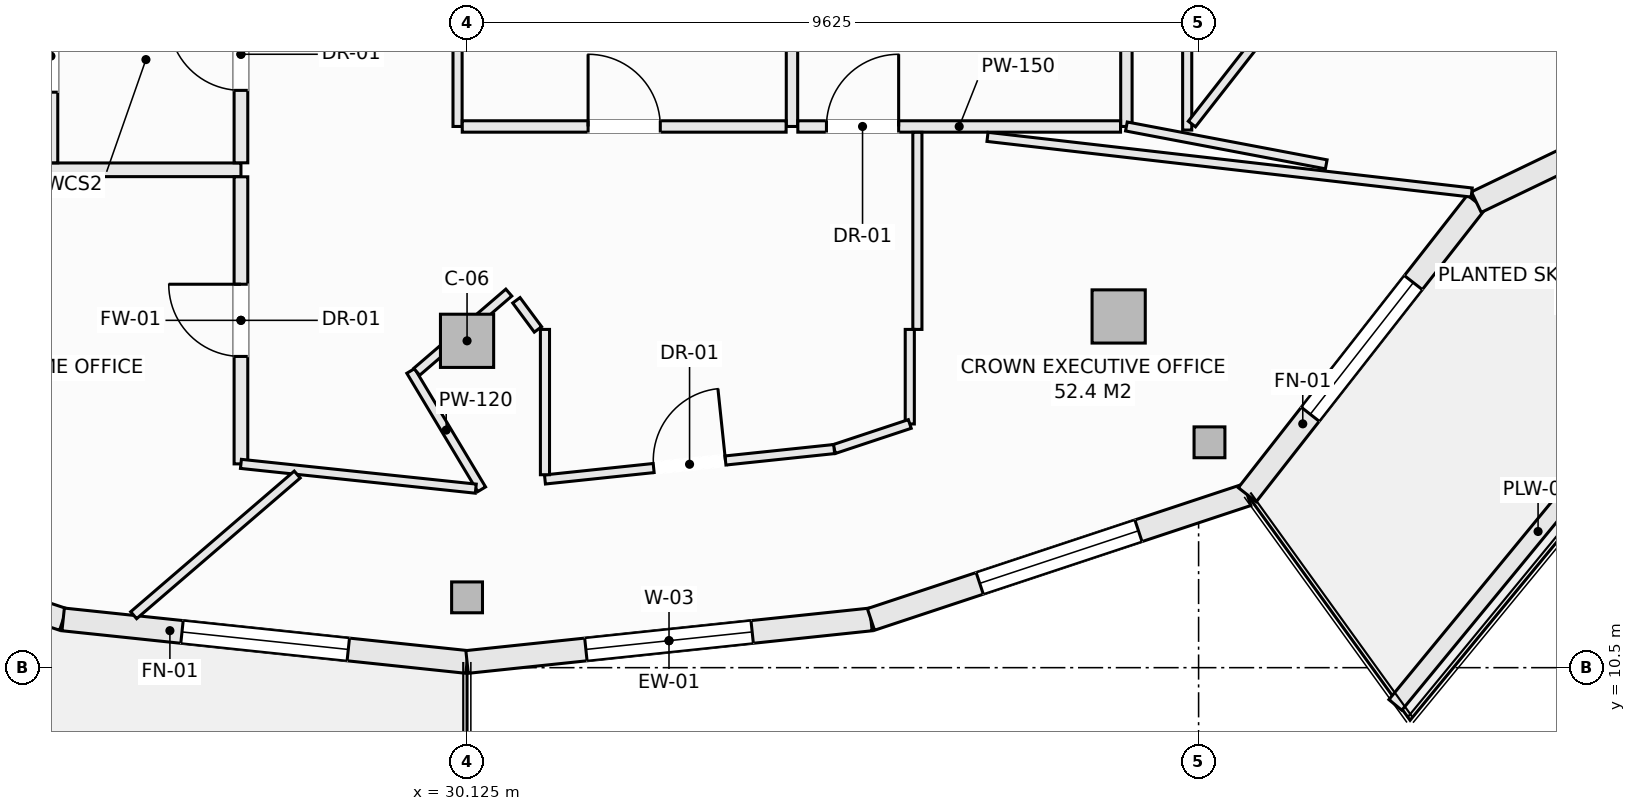
"""IFC4 building model, lengths in metres.
Left out: names, types, materials, properties, quantities, classifications, styles, units other than length and angle.
Written with IfcOpenShell. Run it as: python <this file> out.ifc"""

import sys

from ifc_helpers import new_model, si_unit, direction, frame, frame_2d, origin, origin_2d, place, context, subcontext, project, spatial, rectangle, hollow_rectangle, extrude, element, fill, save


model = new_model("IFC4")
c1 = context("Model", 3, precision=1e-05, world=origin(), true_north=direction((0.0, 1.0)))
c2 = subcontext(c1, "Body", "Model", "MODEL_VIEW")
j1 = project(units=[si_unit("LENGTHUNIT", "METRE"), si_unit("PLANEANGLEUNIT", "RADIAN")], contexts=[c1])
p1 = place(None, origin())
s1 = spatial("IfcSite", under=j1, at=p1, CompositionType="ELEMENT")
p2 = place(p1, origin())
s2 = spatial("IfcBuilding", under=s1, at=p2, CompositionType="ELEMENT")
p3 = place(p2, frame((0.0, 0.0, 259.1)))
s3 = spatial("IfcBuildingStorey", under=s2, at=p3, CompositionType="ELEMENT", Elevation=259.1)
for number, where, z_axis, x_axis in (
    (1, (30.125, 11.425, -0.27), (0.0, 0.0, 1.0), (1.0, 0.0, 0.0)),
    (2, (39.893, 13.465, -0.27), (0.0, 0.0, 1.0), (1.0, 0.0, 0.0)),
):
    element("IfcColumn", number, at=place(p3, frame(where, z_axis=z_axis, x_axis=x_axis)), inside=s3, PredefinedType="COLUMN", context=c2, shape_type="SweptSolid", body=[
        extrude(hollow_rectangle(XDim=0.406, YDim=0.406, WallThickness=0.016, at=origin_2d()), origin(), (0.0, 0.0, 1.0), 3.3),
    ])
for number, where, z_axis, x_axis in (
    (3, (30.125, 14.8, -0.27), (0.0, 0.0, 1.0), (1.0, 0.0, 0.0)),
    (4, (38.698, 15.121, -0.27), (0.0, 0.0, 1.0), (1.0, 0.0, 0.0)),
):
    element("IfcColumn", number, at=place(p3, frame(where, z_axis=z_axis, x_axis=x_axis)), inside=s3, PredefinedType="COLUMN", context=c2, shape_type="SweptSolid", body=[
        extrude(rectangle(XDim=0.7, YDim=0.7, at=origin_2d()), origin(), (0.0, 0.0, 1.0), 3.3),
    ])
p4 = place(p3, frame((19.859, 12.775, 0.0), z_axis=(0.0, 0.0, 1.0), x_axis=(0.949252744709, -0.314514271001, 0.0)))
e5 = element("IfcWall", 5, at=p4, inside=s3, PredefinedType="SOLIDWALL", context=c2, shape_type="SweptSolid", body=[
    extrude(rectangle(XDim=5.216, YDim=0.3, at=frame_2d((2.608, 0.0))), origin(), (0.0, 0.0, 1.0), 2.605),
])
p5 = place(p4, frame((1.708, 0.0, 0.0)))
e6 = element("IfcOpeningElement", 6, at=p5, cuts=e5, PredefinedType="OPENING", context=c2, shape_type="SweptSolid", body=[
    extrude(rectangle(XDim=1.8, YDim=2.25, at=frame_2d((0.9, 1.125))), frame((0.0, 0.16, 0.0), z_axis=(0.0, -1.0, 0.0), x_axis=(1.0, 0.0, 0.0)), (0.0, 0.0, 1.0), 0.32),
])
p6 = place(p3, frame((24.811, 11.135, 0.0), z_axis=(0.0, 0.0, 1.0), x_axis=(0.9944966869, -0.104768028258, 0.0)))
e7 = element("IfcWall", 7, at=p6, inside=s3, PredefinedType="SOLIDWALL", context=c2, shape_type="SweptSolid", body=[
    extrude(rectangle(XDim=5.343, YDim=0.3, at=frame_2d((2.672, 0.0))), origin(), (0.0, 0.0, 1.0), 2.605),
])
p7 = place(p6, frame((1.572, 0.0, 0.72)))
e8 = element("IfcOpeningElement", 8, at=p7, cuts=e7, PredefinedType="OPENING", context=c2, shape_type="SweptSolid", body=[
    extrude(rectangle(XDim=2.2, YDim=1.65, at=frame_2d((1.1, 0.825))), frame((0.0, 0.16, 0.0), z_axis=(0.0, -1.0, 0.0), x_axis=(1.0, 0.0, 0.0)), (0.0, 0.0, 1.0), 0.32),
])
p8 = place(p3, frame((30.125, 10.575, 0.0), z_axis=(0.0, 0.0, 1.0), x_axis=(0.9944966869, 0.104768028258, 0.0)))
e9 = element("IfcWall", 9, at=p8, inside=s3, PredefinedType="SOLIDWALL", context=c2, shape_type="SweptSolid", body=[
    extrude(rectangle(XDim=5.343, YDim=0.3, at=frame_2d((2.672, 0.0))), origin(), (0.0, 0.0, 1.0), 2.605),
])
p9 = place(p8, frame((1.572, 0.0, 0.72)))
e10 = element("IfcOpeningElement", 10, at=p9, cuts=e9, PredefinedType="OPENING", context=c2, shape_type="SweptSolid", body=[
    extrude(rectangle(XDim=2.2, YDim=1.65, at=frame_2d((1.1, 0.825))), frame((0.0, 0.16, 0.0), z_axis=(0.0, -1.0, 0.0), x_axis=(1.0, 0.0, 0.0)), (0.0, 0.0, 1.0), 0.32),
])
p10 = place(p3, frame((35.439, 11.135, 0.0), z_axis=(0.0, 0.0, 1.0), x_axis=(0.949252744709, 0.314514271001, 0.0)))
e11 = element("IfcWall", 11, at=p10, inside=s3, PredefinedType="SOLIDWALL", context=c2, shape_type="SweptSolid", body=[
    extrude(rectangle(XDim=5.216, YDim=0.3, at=frame_2d((2.608, 0.0))), origin(), (0.0, 0.0, 1.0), 2.605),
])
p11 = place(p10, frame((1.508, 0.0, 0.72)))
e12 = element("IfcOpeningElement", 12, at=p11, cuts=e11, PredefinedType="OPENING", context=c2, shape_type="SweptSolid", body=[
    extrude(rectangle(XDim=2.2, YDim=1.65, at=frame_2d((1.1, 0.825))), frame((0.0, 0.16, 0.0), z_axis=(0.0, -1.0, 0.0), x_axis=(1.0, 0.0, 0.0)), (0.0, 0.0, 1.0), 0.32),
])
p12 = place(p3, frame((40.391, 12.775, 0.0), z_axis=(0.0, 0.0, 1.0), x_axis=(0.616413297421, 0.78742278781, 0.0)))
e13 = element("IfcWall", 13, at=p12, inside=s3, PredefinedType="SOLIDWALL", context=c2, shape_type="SweptSolid", body=[
    extrude(rectangle(XDim=4.888, YDim=0.3, at=frame_2d((2.444, 0.0))), origin(), (0.0, 0.0, 1.0), 2.605),
])
p13 = place(p12, frame((1.344, 0.0, 0.72)))
e14 = element("IfcOpeningElement", 14, at=p13, cuts=e13, PredefinedType="OPENING", context=c2, shape_type="SweptSolid", body=[
    extrude(rectangle(XDim=2.2, YDim=1.65, at=frame_2d((1.1, 0.825))), frame((0.0, 0.16, 0.0), z_axis=(0.0, -1.0, 0.0), x_axis=(1.0, 0.0, 0.0)), (0.0, 0.0, 1.0), 0.32),
])
p14 = place(p3, frame((43.404, 16.625, 0.0), z_axis=(0.0, 0.0, 1.0), x_axis=(0.901346013132, 0.433099716706, 0.0)))
e15 = element("IfcWall", 15, at=p14, inside=s3, PredefinedType="SOLIDWALL", context=c2, shape_type="SweptSolid", body=[
    extrude(rectangle(XDim=4.994, YDim=0.3, at=frame_2d((2.497, 0.0))), origin(), (0.0, 0.0, 1.0), 2.605),
])
p15 = place(p14, frame((1.597, 0.0, 0.0)))
e16 = element("IfcOpeningElement", 16, at=p15, cuts=e15, PredefinedType="OPENING", context=c2, shape_type="SweptSolid", body=[
    extrude(rectangle(XDim=1.8, YDim=2.25, at=frame_2d((0.9, 1.125))), frame((0.0, 0.16, 0.0), z_axis=(0.0, -1.0, 0.0), x_axis=(1.0, 0.0, 0.0)), (0.0, 0.0, 1.0), 0.32),
])
p16 = place(p3, frame((42.339, 10.01, 0.0), z_axis=(0.0, 0.0, 1.0), x_axis=(0.635450933862, 0.772141250455, 0.0)))
e17 = element("IfcWall", 17, at=p16, inside=s3, PredefinedType="PARAPET", context=c2, shape_type="SweptSolid", body=[
    extrude(rectangle(XDim=5.91, YDim=0.22, at=frame_2d((2.955, 0.0))), origin(), (0.0, 0.0, 1.0), 0.52),
])
p17 = place(p3, frame((22.15, 17.05, 0.0), z_axis=(0.0, 0.0, 1.0), x_axis=(1.0, 0.0, 0.0)))
e18 = element("IfcWall", 18, at=p17, inside=s3, PredefinedType="SOLIDWALL", context=c2, shape_type="SweptSolid", body=[
    extrude(rectangle(XDim=5.0, YDim=0.18, at=frame_2d((2.5, 0.0))), origin(), (0.0, 0.0, 1.0), 3.03),
])
p18 = place(p3, frame((24.65, 17.142, 0.0), z_axis=(0.0, 0.0, 1.0), x_axis=(0.0, 1.0, 0.0)))
e19 = element("IfcWall", 19, at=p18, inside=s3, PredefinedType="SOLIDWALL", context=c2, shape_type="SweptSolid", body=[
    extrude(rectangle(XDim=2.808, YDim=0.18, at=frame_2d((1.404, 0.0))), origin(), (0.0, 0.0, 1.0), 3.03),
])
p19 = place(p18, frame((0.929, 0.0, 0.0)))
e20 = element("IfcOpeningElement", 20, at=p19, cuts=e19, PredefinedType="OPENING", context=c2, shape_type="SweptSolid", body=[
    extrude(rectangle(XDim=0.95, YDim=2.1, at=frame_2d((0.475, 1.05))), frame((0.0, 0.1, 0.0), z_axis=(0.0, -1.0, 0.0), x_axis=(1.0, 0.0, 0.0)), (0.0, 0.0, 1.0), 0.2),
])
p20 = place(p3, frame((27.15, 13.181, 0.0), z_axis=(0.0, 0.0, 1.0), x_axis=(0.0, 1.0, 0.0)))
e21 = element("IfcWall", 21, at=p20, inside=s3, PredefinedType="SOLIDWALL", context=c2, shape_type="SweptSolid", body=[
    extrude(rectangle(XDim=3.777, YDim=0.18, at=frame_2d((1.889, 0.0))), origin(), (0.0, 0.0, 1.0), 3.03),
])
p21 = place(p20, frame((1.414, 0.0, 0.0)))
e22 = element("IfcOpeningElement", 22, at=p21, cuts=e21, PredefinedType="OPENING", context=c2, shape_type="SweptSolid", body=[
    extrude(rectangle(XDim=0.95, YDim=2.1, at=frame_2d((0.475, 1.05))), frame((0.0, 0.1, 0.0), z_axis=(0.0, -1.0, 0.0), x_axis=(1.0, 0.0, 0.0)), (0.0, 0.0, 1.0), 0.2),
])
p22 = place(p3, frame((27.15, 17.142, 0.0), z_axis=(0.0, 0.0, 1.0), x_axis=(0.0, 1.0, 0.0)))
e23 = element("IfcWall", 23, at=p22, inside=s3, PredefinedType="SOLIDWALL", context=c2, shape_type="SweptSolid", body=[
    extrude(rectangle(XDim=2.856, YDim=0.18, at=frame_2d((1.428, 0.0))), origin(), (0.0, 0.0, 1.0), 3.03),
])
p23 = place(p22, frame((0.953, 0.0, 0.0)))
e24 = element("IfcOpeningElement", 24, at=p23, cuts=e23, PredefinedType="OPENING", context=c2, shape_type="SweptSolid", body=[
    extrude(rectangle(XDim=0.95, YDim=2.1, at=frame_2d((0.475, 1.05))), frame((0.0, 0.1, 0.0), z_axis=(0.0, -1.0, 0.0), x_axis=(1.0, 0.0, 0.0)), (0.0, 0.0, 1.0), 0.2),
])
p24 = place(p3, frame((30.0, 17.62, 0.0), z_axis=(0.0, 0.0, 1.0), x_axis=(0.0, 1.0, 0.0)))
e25 = element("IfcWall", 25, at=p24, inside=s3, PredefinedType="PARTITIONING", context=c2, shape_type="SweptSolid", body=[
    extrude(rectangle(XDim=2.18, YDim=0.12, at=frame_2d((1.09, 0.0))), origin(), (0.0, 0.0, 1.0), 3.03),
])
for number, where, z_axis, x_axis in (
    (26, (38.8, 17.62, 0.0), (0.0, 0.0, 1.0), (0.0, 1.0, 0.0)),
    (27, (34.4, 17.62, 0.0), (0.0, 0.0, 1.0), (0.0, 1.0, 0.0)),
):
    element("IfcWall", number, at=place(p3, frame(where, z_axis=z_axis, x_axis=x_axis)), inside=s3, PredefinedType="PARTITIONING", context=c2, shape_type="SweptSolid", body=[
        extrude(rectangle(XDim=2.18, YDim=0.15, at=frame_2d((1.09, 0.0))), origin(), (0.0, 0.0, 1.0), 3.03),
    ])
p25 = place(p3, frame((30.062, 17.62, 0.0), z_axis=(0.0, 0.0, 1.0), x_axis=(1.0, 0.0, 0.0)))
e28 = element("IfcWall", 28, at=p25, inside=s3, PredefinedType="PARTITIONING", context=c2, shape_type="SweptSolid", body=[
    extrude(rectangle(XDim=4.261, YDim=0.15, at=frame_2d((2.13, 0.0))), origin(), (0.0, 0.0, 1.0), 3.03),
])
p26 = place(p25, frame((1.656, 0.0, 0.0)))
e29 = element("IfcOpeningElement", 29, at=p26, cuts=e28, PredefinedType="OPENING", context=c2, shape_type="SweptSolid", body=[
    extrude(rectangle(XDim=0.95, YDim=2.1, at=frame_2d((0.475, 1.05))), frame((0.0, 0.085, 0.0), z_axis=(0.0, -1.0, 0.0), x_axis=(1.0, 0.0, 0.0)), (0.0, 0.0, 1.0), 0.17),
])
p27 = place(p3, frame((34.477, 17.62, 0.0), z_axis=(0.0, 0.0, 1.0), x_axis=(1.0, 0.0, 0.0)))
e30 = element("IfcWall", 30, at=p27, inside=s3, PredefinedType="PARTITIONING", context=c2, shape_type="SweptSolid", body=[
    extrude(rectangle(XDim=4.246, YDim=0.15, at=frame_2d((2.123, 0.0))), origin(), (0.0, 0.0, 1.0), 3.03),
])
p28 = place(p27, frame((0.376, 0.0, 0.0)))
e31 = element("IfcOpeningElement", 31, at=p28, cuts=e30, PredefinedType="OPENING", context=c2, shape_type="SweptSolid", body=[
    extrude(rectangle(XDim=0.95, YDim=2.1, at=frame_2d((0.475, 1.05))), frame((0.0, 0.085, 0.0), z_axis=(0.0, -1.0, 0.0), x_axis=(1.0, 0.0, 0.0)), (0.0, 0.0, 1.0), 0.17),
])
p29 = place(p3, frame((39.6, 17.573, 0.0), z_axis=(0.0, 0.0, 1.0), x_axis=(0.0, 1.0, 0.0)))
e32 = element("IfcWall", 32, at=p29, inside=s3, PredefinedType="PARTITIONING", context=c2, shape_type="SweptSolid", body=[
    extrude(rectangle(XDim=5.447, YDim=0.12, at=frame_2d((2.724, 0.0))), origin(), (0.0, 0.0, 1.0), 2.478),
])
p30 = place(p3, frame((39.662, 17.652, 0.0), z_axis=(0.0, 0.0, 1.0), x_axis=(0.616212345115, 0.78758005671, 0.0)))
e33 = element("IfcWall", 33, at=p30, inside=s3, PredefinedType="PARTITIONING", context=c2, shape_type="SweptSolid", body=[
    extrude(rectangle(XDim=2.333, YDim=0.12, at=frame_2d((1.167, 0.0))), origin(), (0.0, 0.0, 1.0), 2.478),
])
p31 = place(p3, frame((36.05, 14.95, 0.0), z_axis=(0.0, 0.0, 1.0), x_axis=(0.0, 1.0, 0.0)))
e34 = element("IfcWall", 34, at=p31, inside=s3, PredefinedType="PARTITIONING", context=c2, shape_type="SweptSolid", body=[
    extrude(rectangle(XDim=2.593, YDim=0.12, at=frame_2d((1.296, 0.0))), origin(), (0.0, 0.0, 1.0), 3.03),
])
p32 = place(p3, frame((35.95, 13.706, 0.0), z_axis=(0.0, 0.0, 1.0), x_axis=(0.0, 1.0, 0.0)))
e35 = element("IfcWall", 35, at=p32, inside=s3, PredefinedType="PARTITIONING", context=c2, shape_type="SweptSolid", body=[
    extrude(rectangle(XDim=1.244, YDim=0.12, at=frame_2d((0.622, 0.0))), origin(), (0.0, 0.0, 1.0), 3.03),
])
p33 = place(p3, frame((34.955, 13.376, 0.0), z_axis=(0.0, 0.0, 1.0), x_axis=(0.949124905871, 0.314899846071, 0.0)))
e36 = element("IfcWall", 36, at=p33, inside=s3, PredefinedType="PARTITIONING", context=c2, shape_type="SweptSolid", body=[
    extrude(rectangle(XDim=1.048, YDim=0.12, at=frame_2d((0.524, 0.0))), origin(), (0.0, 0.0, 1.0), 3.03),
])
p34 = place(p3, frame((31.15, 12.976, 0.0), z_axis=(0.0, 0.0, 1.0), x_axis=(0.994522920899, 0.104518705533, 0.0)))
e37 = element("IfcWall", 37, at=p34, inside=s3, PredefinedType="PARTITIONING", context=c2, shape_type="SweptSolid", body=[
    extrude(rectangle(XDim=3.826, YDim=0.12, at=frame_2d((1.913, 0.0))), origin(), (0.0, 0.0, 1.0), 3.03),
])
p35 = place(p34, frame((1.438, 0.0, 0.0)))
e38 = element("IfcOpeningElement", 38, at=p35, cuts=e37, PredefinedType="OPENING", context=c2, shape_type="SweptSolid", body=[
    extrude(rectangle(XDim=0.95, YDim=2.1, at=frame_2d((0.475, 1.05))), frame((0.0, 0.07, 0.0), z_axis=(0.0, -1.0, 0.0), x_axis=(1.0, 0.0, 0.0)), (0.0, 0.0, 1.0), 0.14),
])
p36 = place(p3, frame((31.15, 13.038, 0.0), z_axis=(0.0, 0.0, 1.0), x_axis=(0.0, 1.0, 0.0)))
e39 = element("IfcWall", 39, at=p36, inside=s3, PredefinedType="PARTITIONING", context=c2, shape_type="SweptSolid", body=[
    extrude(rectangle(XDim=1.912, YDim=0.12, at=frame_2d((0.956, 0.0))), origin(), (0.0, 0.0, 1.0), 3.03),
])
p37 = place(p3, frame((30.774, 15.333, 0.0), z_axis=(0.0, 0.0, 1.0), x_axis=(0.595814974861, -0.803121731577, 0.0)))
e40 = element("IfcWall", 40, at=p37, inside=s3, PredefinedType="PARTITIONING", context=c2, shape_type="SweptSolid", body=[
    extrude(rectangle(XDim=0.477, YDim=0.12, at=frame_2d((0.239, 0.0))), origin(), (0.0, 0.0, 1.0), 3.03),
])
p38 = place(p3, frame((29.384, 14.404, 0.0), z_axis=(0.0, 0.0, 1.0), x_axis=(0.513922040123, -0.857836893982, 0.0)))
e41 = element("IfcWall", 41, at=p38, inside=s3, PredefinedType="PARTITIONING", context=c2, shape_type="SweptSolid", body=[
    extrude(rectangle(XDim=1.815, YDim=0.12, at=frame_2d((0.908, 0.0))), origin(), (0.0, 0.0, 1.0), 2.77),
])
p39 = place(p3, frame((27.15, 13.181, 0.0), z_axis=(0.0, 0.0, 1.0), x_axis=(0.994482609393, -0.104901571076, 0.0)))
e42 = element("IfcWall", 42, at=p39, inside=s3, PredefinedType="PARTITIONING", context=c2, shape_type="SweptSolid", body=[
    extrude(rectangle(XDim=3.107, YDim=0.12, at=frame_2d((1.553, 0.0))), origin(), (0.0, 0.0, 1.0), 3.03),
])
p40 = place(p3, frame((25.739, 11.19, 0.0), z_axis=(0.0, 0.0, 1.0), x_axis=(0.75818689734, 0.652037290883, 0.0)))
e43 = element("IfcWall", 43, at=p40, inside=s3, PredefinedType="PARTITIONING", context=c2, shape_type="SweptSolid", body=[
    extrude(rectangle(XDim=2.838, YDim=0.12, at=frame_2d((1.419, 0.0))), origin(), (0.0, 0.0, 1.0), 3.03),
])
p41 = place(p3, frame((29.463, 14.393, 0.0), z_axis=(0.0, 0.0, 1.0), x_axis=(0.758209368839, 0.652011160184, 0.0)))
e44 = element("IfcWall", 44, at=p41, inside=s3, PredefinedType="PARTITIONING", context=c2, shape_type="SweptSolid", body=[
    extrude(rectangle(XDim=1.598, YDim=0.12, at=frame_2d((0.799, 0.0))), origin(), (0.0, 0.0, 1.0), 3.03),
])
p42 = place(p3, frame((36.972, 17.483, 0.0), z_axis=(0.0, 0.0, 1.0), x_axis=(0.993465006101, -0.114137117773, 0.0)))
e45 = element("IfcWall", 45, at=p42, inside=s3, PredefinedType="PARTITIONING", context=c2, shape_type="SweptSolid", body=[
    extrude(rectangle(XDim=6.413, YDim=0.12, at=frame_2d((3.207, 0.0))), origin(), (0.0, 0.0, 1.0), 2.77),
])
p43 = place(p3, frame((38.8, 17.62, 0.0), z_axis=(0.0, 0.0, 1.0), x_axis=(0.982513005499, -0.186193968823, 0.0)))
e46 = element("IfcWall", 46, at=p43, inside=s3, PredefinedType="PARTITIONING", context=c2, shape_type="SweptSolid", body=[
    extrude(rectangle(XDim=2.676, YDim=0.12, at=frame_2d((1.338, 0.0))), origin(), (0.0, 0.0, 1.0), 3.03),
])
p44 = place(p7, origin())
e47 = element("IfcWindow", 47, at=p44, inside=s3, PartitioningType="SINGLE_PANEL", PredefinedType="WINDOW", context=c2, shape_type="SweptSolid", body=[
    extrude(rectangle(XDim=2.2, YDim=1.65, at=frame_2d((1.1, 0.825))), frame((0.0, 0.03, 0.0), z_axis=(0.0, -1.0, 0.0), x_axis=(1.0, 0.0, 0.0)), (0.0, 0.0, 1.0), 0.06),
])
fill(e8, e47)
p45 = place(p9, origin())
e48 = element("IfcWindow", 48, at=p45, inside=s3, PartitioningType="SINGLE_PANEL", PredefinedType="WINDOW", context=c2, shape_type="SweptSolid", body=[
    extrude(rectangle(XDim=2.2, YDim=1.65, at=frame_2d((1.1, 0.825))), frame((0.0, 0.03, 0.0), z_axis=(0.0, -1.0, 0.0), x_axis=(1.0, 0.0, 0.0)), (0.0, 0.0, 1.0), 0.06),
])
fill(e10, e48)
p46 = place(p11, origin())
e49 = element("IfcWindow", 49, at=p46, inside=s3, PartitioningType="SINGLE_PANEL", PredefinedType="WINDOW", context=c2, shape_type="SweptSolid", body=[
    extrude(rectangle(XDim=2.2, YDim=1.65, at=frame_2d((1.1, 0.825))), frame((0.0, 0.03, 0.0), z_axis=(0.0, -1.0, 0.0), x_axis=(1.0, 0.0, 0.0)), (0.0, 0.0, 1.0), 0.06),
])
fill(e12, e49)
p47 = place(p13, origin())
e50 = element("IfcWindow", 50, at=p47, inside=s3, PartitioningType="SINGLE_PANEL", PredefinedType="WINDOW", context=c2, shape_type="SweptSolid", body=[
    extrude(rectangle(XDim=2.2, YDim=1.65, at=frame_2d((1.1, 0.825))), frame((0.0, 0.03, 0.0), z_axis=(0.0, -1.0, 0.0), x_axis=(1.0, 0.0, 0.0)), (0.0, 0.0, 1.0), 0.06),
])
fill(e14, e50)
p48 = place(p23, origin())
e51 = element("IfcDoor", 51, at=p48, inside=s3, OperationType="SINGLE_SWING_RIGHT", PredefinedType="DOOR", context=c2, shape_type="SweptSolid", body=[
    extrude(rectangle(XDim=0.95, YDim=2.1, at=frame_2d((0.475, 1.05))), frame((0.0, 0.025, 0.0), z_axis=(0.0, -1.0, 0.0), x_axis=(1.0, 0.0, 0.0)), (0.0, 0.0, 1.0), 0.05),
])
fill(e24, e51)
p49 = place(p26, origin())
e52 = element("IfcDoor", 52, at=p49, inside=s3, OperationType="SINGLE_SWING_LEFT", PredefinedType="DOOR", context=c2, shape_type="SweptSolid", body=[
    extrude(rectangle(XDim=0.95, YDim=2.1, at=frame_2d((0.475, 1.05))), frame((0.0, 0.025, 0.0), z_axis=(0.0, -1.0, 0.0), x_axis=(1.0, 0.0, 0.0)), (0.0, 0.0, 1.0), 0.05),
])
fill(e29, e52)
p50 = place(p28, origin())
e53 = element("IfcDoor", 53, at=p50, inside=s3, OperationType="SINGLE_SWING_RIGHT", PredefinedType="DOOR", context=c2, shape_type="SweptSolid", body=[
    extrude(rectangle(XDim=0.95, YDim=2.1, at=frame_2d((0.475, 1.05))), frame((0.0, 0.025, 0.0), z_axis=(0.0, -1.0, 0.0), x_axis=(1.0, 0.0, 0.0)), (0.0, 0.0, 1.0), 0.05),
])
fill(e31, e53)
p51 = place(p35, origin())
e54 = element("IfcDoor", 54, at=p51, inside=s3, OperationType="SINGLE_SWING_RIGHT", PredefinedType="DOOR", context=c2, shape_type="SweptSolid", body=[
    extrude(rectangle(XDim=0.95, YDim=2.1, at=frame_2d((0.475, 1.05))), frame((0.0, 0.025, 0.0), z_axis=(0.0, -1.0, 0.0), x_axis=(1.0, 0.0, 0.0)), (0.0, 0.0, 1.0), 0.05),
])
fill(e38, e54)
p52 = place(p21, origin())
e55 = element("IfcDoor", 55, at=p52, inside=s3, OperationType="SINGLE_SWING_RIGHT", PredefinedType="DOOR", context=c2, shape_type="SweptSolid", body=[
    extrude(rectangle(XDim=0.95, YDim=2.1, at=frame_2d((0.475, 1.05))), frame((0.0, 0.025, 0.0), z_axis=(0.0, -1.0, 0.0), x_axis=(1.0, 0.0, 0.0)), (0.0, 0.0, 1.0), 0.05),
])
fill(e22, e55)
p53 = place(p19, origin())
e56 = element("IfcDoor", 56, at=p53, inside=s3, OperationType="SINGLE_SWING_LEFT", PredefinedType="DOOR", context=c2, shape_type="SweptSolid", body=[
    extrude(rectangle(XDim=0.95, YDim=2.1, at=frame_2d((0.475, 1.05))), frame((0.0, 0.025, 0.0), z_axis=(0.0, -1.0, 0.0), x_axis=(1.0, 0.0, 0.0)), (0.0, 0.0, 1.0), 0.05),
])
fill(e20, e56)
save(model, sys.argv[1])
